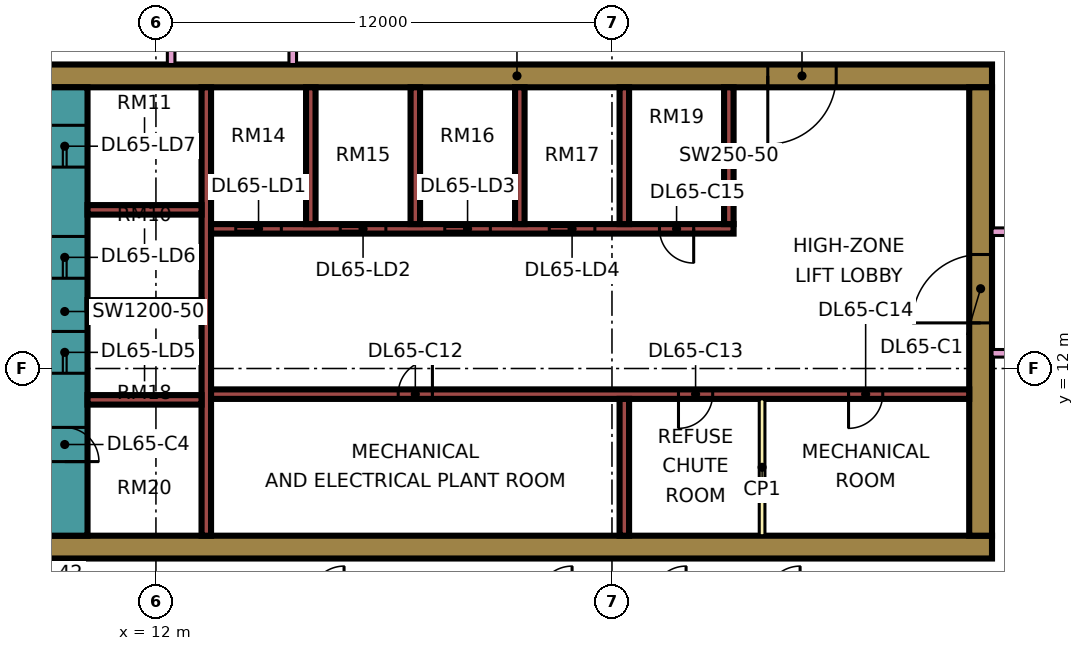
"""IFC4 building model, lengths in metres.
Left out: names, types, materials, properties, quantities, classifications, styles, units other than length and angle.
Written with IfcOpenShell. Run it as: python <this file> out.ifc"""

import sys

from ifc_helpers import new_model, si_unit, direction, frame, frame_2d, origin, place, context, subcontext, project, spatial, rectangle, extrude, element, fill, save


model = new_model("IFC4")
c1 = context("Model", 3, precision=1e-05, world=origin(), true_north=direction((0.0, 1.0)))
c2 = subcontext(c1, "Body", "Model", "MODEL_VIEW")
j1 = project(units=[si_unit("LENGTHUNIT", "METRE"), si_unit("PLANEANGLEUNIT", "RADIAN")], contexts=[c1])
p1 = place(None, origin())
s1 = spatial("IfcSite", under=j1, at=p1, CompositionType="ELEMENT")
p2 = place(p1, origin())
s2 = spatial("IfcBuilding", under=s1, at=p2, CompositionType="ELEMENT")
p3 = place(p2, frame((0.0, 0.0, 280.9)))
s3 = spatial("IfcBuildingStorey", under=s2, at=p3, CompositionType="ELEMENT", Elevation=280.9)
p4 = place(p3, frame((9.0, 7.3, 0.0), z_axis=(0.0, 0.0, 1.0), x_axis=(1.0, 0.0, 0.0)))
e1 = element("IfcWall", 1, at=p4, inside=s3, PredefinedType="SHEAR", context=c2, shape_type="SweptSolid", body=[
    extrude(rectangle(XDim=25.0, YDim=0.6, at=frame_2d((12.5, 0.0))), origin(), (0.0, 0.0, 1.0), 3.75),
])
p5 = place(p3, frame((9.0, 19.7, 0.0), z_axis=(0.0, 0.0, 1.0), x_axis=(1.0, 0.0, 0.0)))
e2 = element("IfcWall", 2, at=p5, inside=s3, PredefinedType="SHEAR", context=c2, shape_type="SweptSolid", body=[
    extrude(rectangle(XDim=25.0, YDim=0.6, at=frame_2d((12.5, 0.0))), origin(), (0.0, 0.0, 1.0), 3.75),
])
p6 = place(p5, frame((19.1, 0.0, 0.0)))
e3 = element("IfcOpeningElement", 3, at=p6, cuts=e2, PredefinedType="OPENING", context=c2, shape_type="SweptSolid", body=[
    extrude(rectangle(XDim=1.8, YDim=2.4, at=frame_2d((0.9, 1.2))), frame((0.0, 0.31, 0.0), z_axis=(0.0, -1.0, 0.0), x_axis=(1.0, 0.0, 0.0)), (0.0, 0.0, 1.0), 0.62),
])
p7 = place(p3, frame((9.6, 7.6, 0.0), z_axis=(0.0, 0.0, 1.0), x_axis=(0.0, 1.0, 0.0)))
e4 = element("IfcWall", 4, at=p7, inside=s3, PredefinedType="SHEAR", context=c2, shape_type="SweptSolid", body=[
    extrude(rectangle(XDim=11.8, YDim=1.2, at=frame_2d((5.9, 0.0))), origin(), (0.0, 0.0, 1.0), 3.75),
])
p8 = place(p7, frame((4.275, 0.0, 0.0)))
e5 = element("IfcOpeningElement", 5, at=p8, cuts=e4, PredefinedType="OPENING", context=c2, shape_type="SweptSolid", body=[
    extrude(rectangle(XDim=1.1, YDim=2.2, at=frame_2d((0.55, 1.1))), frame((0.0, 0.61, 0.0), z_axis=(0.0, -1.0, 0.0), x_axis=(1.0, 0.0, 0.0)), (0.0, 0.0, 1.0), 1.22),
])
p9 = place(p7, frame((6.775, 0.0, 0.0)))
e6 = element("IfcOpeningElement", 6, at=p9, cuts=e4, PredefinedType="OPENING", context=c2, shape_type="SweptSolid", body=[
    extrude(rectangle(XDim=1.1, YDim=2.2, at=frame_2d((0.55, 1.1))), frame((0.0, 0.61, 0.0), z_axis=(0.0, -1.0, 0.0), x_axis=(1.0, 0.0, 0.0)), (0.0, 0.0, 1.0), 1.22),
])
p10 = place(p7, frame((9.7, 0.0, 0.0)))
e7 = element("IfcOpeningElement", 7, at=p10, cuts=e4, PredefinedType="OPENING", context=c2, shape_type="SweptSolid", body=[
    extrude(rectangle(XDim=1.1, YDim=2.2, at=frame_2d((0.55, 1.1))), frame((0.0, 0.61, 0.0), z_axis=(0.0, -1.0, 0.0), x_axis=(1.0, 0.0, 0.0)), (0.0, 0.0, 1.0), 1.22),
])
p11 = place(p7, frame((1.95, 0.0, 0.0)))
e8 = element("IfcOpeningElement", 8, at=p11, cuts=e4, PredefinedType="OPENING", context=c2, shape_type="SweptSolid", body=[
    extrude(rectangle(XDim=0.9, YDim=2.1, at=frame_2d((0.45, 1.05))), frame((0.0, 0.61, 0.0), z_axis=(0.0, -1.0, 0.0), x_axis=(1.0, 0.0, 0.0)), (0.0, 0.0, 1.0), 1.22),
])
p12 = place(p3, frame((33.7, 7.6, 0.0), z_axis=(0.0, 0.0, 1.0), x_axis=(0.0, 1.0, 0.0)))
e9 = element("IfcWall", 9, at=p12, inside=s3, PredefinedType="SHEAR", context=c2, shape_type="SweptSolid", body=[
    extrude(rectangle(XDim=11.8, YDim=0.6, at=frame_2d((5.9, 0.0))), origin(), (0.0, 0.0, 1.0), 3.75),
])
p13 = place(p12, frame((5.6, 0.0, 0.0)))
e10 = element("IfcOpeningElement", 10, at=p13, cuts=e9, PredefinedType="OPENING", context=c2, shape_type="SweptSolid", body=[
    extrude(rectangle(XDim=1.8, YDim=2.4, at=frame_2d((0.9, 1.2))), frame((0.0, 0.31, 0.0), z_axis=(0.0, -1.0, 0.0), x_axis=(1.0, 0.0, 0.0)), (0.0, 0.0, 1.0), 0.62),
])
p14 = place(p3, frame((13.325, 7.6, 0.0), z_axis=(0.0, 0.0, 1.0), x_axis=(0.0, 1.0, 0.0)))
e11 = element("IfcWall", 11, at=p14, inside=s3, PredefinedType="SHEAR", context=c2, shape_type="SweptSolid", body=[
    extrude(rectangle(XDim=11.8, YDim=0.25, at=frame_2d((5.9, 0.0))), origin(), (0.0, 0.0, 1.0), 3.75),
])
p15 = place(p3, frame((13.45, 11.325, 0.0), z_axis=(0.0, 0.0, 1.0), x_axis=(1.0, 0.0, 0.0)))
e12 = element("IfcWall", 12, at=p15, inside=s3, PredefinedType="SHEAR", context=c2, shape_type="SweptSolid", body=[
    extrude(rectangle(XDim=19.95, YDim=0.25, at=frame_2d((9.975, 0.0))), origin(), (0.0, 0.0, 1.0), 3.75),
])
p16 = place(p15, frame((4.925, 0.0, 0.0)))
e13 = element("IfcOpeningElement", 13, at=p16, cuts=e12, PredefinedType="OPENING", context=c2, shape_type="SweptSolid", body=[
    extrude(rectangle(XDim=0.9, YDim=2.1, at=frame_2d((0.45, 1.05))), frame((0.0, 0.135, 0.0), z_axis=(0.0, -1.0, 0.0), x_axis=(1.0, 0.0, 0.0)), (0.0, 0.0, 1.0), 0.27),
])
p17 = place(p15, frame((12.3, 0.0, 0.0)))
e14 = element("IfcOpeningElement", 14, at=p17, cuts=e12, PredefinedType="OPENING", context=c2, shape_type="SweptSolid", body=[
    extrude(rectangle(XDim=0.9, YDim=2.1, at=frame_2d((0.45, 1.05))), frame((0.0, 0.135, 0.0), z_axis=(0.0, -1.0, 0.0), x_axis=(1.0, 0.0, 0.0)), (0.0, 0.0, 1.0), 0.27),
])
p18 = place(p15, frame((16.775, 0.0, 0.0)))
e15 = element("IfcOpeningElement", 15, at=p18, cuts=e12, PredefinedType="OPENING", context=c2, shape_type="SweptSolid", body=[
    extrude(rectangle(XDim=0.9, YDim=2.1, at=frame_2d((0.45, 1.05))), frame((0.0, 0.135, 0.0), z_axis=(0.0, -1.0, 0.0), x_axis=(1.0, 0.0, 0.0)), (0.0, 0.0, 1.0), 0.27),
])
p19 = place(p3, frame((13.45, 15.675, 0.0), z_axis=(0.0, 0.0, 1.0), x_axis=(1.0, 0.0, 0.0)))
e16 = element("IfcWall", 16, at=p19, inside=s3, PredefinedType="SHEAR", context=c2, shape_type="SweptSolid", body=[
    extrude(rectangle(XDim=13.75, YDim=0.25, at=frame_2d((6.875, 0.0))), origin(), (0.0, 0.0, 1.0), 3.75),
])
p20 = place(p19, frame((0.65, 0.0, 0.0)))
e17 = element("IfcOpeningElement", 17, at=p20, cuts=e16, PredefinedType="OPENING", context=c2, shape_type="SweptSolid", body=[
    extrude(rectangle(XDim=1.2, YDim=2.2, at=frame_2d((0.6, 1.1))), frame((0.0, 0.135, 0.0), z_axis=(0.0, -1.0, 0.0), x_axis=(1.0, 0.0, 0.0)), (0.0, 0.0, 1.0), 0.27),
])
p21 = place(p19, frame((3.4, 0.0, 0.0)))
e18 = element("IfcOpeningElement", 18, at=p21, cuts=e16, PredefinedType="OPENING", context=c2, shape_type="SweptSolid", body=[
    extrude(rectangle(XDim=1.2, YDim=2.2, at=frame_2d((0.6, 1.1))), frame((0.0, 0.135, 0.0), z_axis=(0.0, -1.0, 0.0), x_axis=(1.0, 0.0, 0.0)), (0.0, 0.0, 1.0), 0.27),
])
p22 = place(p19, frame((6.15, 0.0, 0.0)))
e19 = element("IfcOpeningElement", 19, at=p22, cuts=e16, PredefinedType="OPENING", context=c2, shape_type="SweptSolid", body=[
    extrude(rectangle(XDim=1.2, YDim=2.2, at=frame_2d((0.6, 1.1))), frame((0.0, 0.135, 0.0), z_axis=(0.0, -1.0, 0.0), x_axis=(1.0, 0.0, 0.0)), (0.0, 0.0, 1.0), 0.27),
])
p23 = place(p19, frame((8.9, 0.0, 0.0)))
e20 = element("IfcOpeningElement", 20, at=p23, cuts=e16, PredefinedType="OPENING", context=c2, shape_type="SweptSolid", body=[
    extrude(rectangle(XDim=1.2, YDim=2.2, at=frame_2d((0.6, 1.1))), frame((0.0, 0.135, 0.0), z_axis=(0.0, -1.0, 0.0), x_axis=(1.0, 0.0, 0.0)), (0.0, 0.0, 1.0), 0.27),
])
p24 = place(p19, frame((11.8, 0.0, 0.0)))
e21 = element("IfcOpeningElement", 21, at=p24, cuts=e16, PredefinedType="OPENING", context=c2, shape_type="SweptSolid", body=[
    extrude(rectangle(XDim=0.9, YDim=2.1, at=frame_2d((0.45, 1.05))), frame((0.0, 0.135, 0.0), z_axis=(0.0, -1.0, 0.0), x_axis=(1.0, 0.0, 0.0)), (0.0, 0.0, 1.0), 0.27),
])
for number, where, z_axis, x_axis in (
    (22, (10.2, 11.175, 0.0), (0.0, 0.0, 1.0), (1.0, 0.0, 0.0)),
    (23, (10.2, 13.675, 0.0), (0.0, 0.0, 1.0), (1.0, 0.0, 0.0)),
    (24, (10.2, 16.175, 0.0), (0.0, 0.0, 1.0), (1.0, 0.0, 0.0)),
):
    element("IfcWall", number, at=place(p3, frame(where, z_axis=z_axis, x_axis=x_axis)), inside=s3, PredefinedType="SHEAR", context=c2, shape_type="SweptSolid", body=[
        extrude(rectangle(XDim=3.0, YDim=0.25, at=frame_2d((1.5, 0.0))), origin(), (0.0, 0.0, 1.0), 3.75),
    ])
for number, where, z_axis, x_axis in (
    (25, (24.325, 7.6, 0.0), (0.0, 0.0, 1.0), (0.0, 1.0, 0.0)),
    (26, (16.075, 15.8, 0.0), (0.0, 0.0, 1.0), (0.0, 1.0, 0.0)),
    (27, (18.825, 15.8, 0.0), (0.0, 0.0, 1.0), (0.0, 1.0, 0.0)),
    (28, (21.575, 15.8, 0.0), (0.0, 0.0, 1.0), (0.0, 1.0, 0.0)),
    (29, (24.325, 15.8, 0.0), (0.0, 0.0, 1.0), (0.0, 1.0, 0.0)),
    (30, (27.075, 15.8, 0.0), (0.0, 0.0, 1.0), (0.0, 1.0, 0.0)),
):
    element("IfcWall", number, at=place(p3, frame(where, z_axis=z_axis, x_axis=x_axis)), inside=s3, PredefinedType="SHEAR", context=c2, shape_type="SweptSolid", body=[
        extrude(rectangle(XDim=3.6, YDim=0.25, at=frame_2d((1.8, 0.0))), origin(), (0.0, 0.0, 1.0), 3.75),
    ])
p25 = place(p3, frame((-1.447, 12.553, 0.0), z_axis=(0.0, 0.0, 1.0), x_axis=(0.707106781187, -0.707106781187, 0.0)))
e31 = element("IfcWall", 31, at=p25, inside=s3, PredefinedType="SOLIDWALL", context=c2, shape_type="SweptSolid", body=[
    extrude(rectangle(XDim=19.799, YDim=0.15, at=frame_2d((9.899, 0.0))), origin(), (0.0, 0.0, 1.0), 3.35),
])
p26 = place(p25, frame((2.212, 0.0, 0.45)))
e32 = element("IfcOpeningElement", 32, at=p26, cuts=e31, PredefinedType="OPENING", context=c2, shape_type="SweptSolid", body=[
    extrude(rectangle(XDim=3.0, YDim=2.4, at=frame_2d((1.5, 1.2))), frame((0.0, 0.085, 0.0), z_axis=(0.0, -1.0, 0.0), x_axis=(1.0, 0.0, 0.0)), (0.0, 0.0, 1.0), 0.17),
])
p27 = place(p25, frame((10.216, 0.0, 0.45)))
e33 = element("IfcOpeningElement", 33, at=p27, cuts=e31, PredefinedType="OPENING", context=c2, shape_type="SweptSolid", body=[
    extrude(rectangle(XDim=3.0, YDim=2.4, at=frame_2d((1.5, 1.2))), frame((0.0, 0.085, 0.0), z_axis=(0.0, -1.0, 0.0), x_axis=(1.0, 0.0, 0.0)), (0.0, 0.0, 1.0), 0.17),
])
p28 = place(p3, frame((27.95, 7.6, 0.0), z_axis=(0.0, 0.0, 1.0), x_axis=(0.0, 1.0, 0.0)))
e34 = element("IfcWall", 34, at=p28, inside=s3, PredefinedType="PARTITIONING", context=c2, shape_type="SweptSolid", body=[
    extrude(rectangle(XDim=3.6, YDim=0.15, at=frame_2d((1.8, 0.0))), origin(), (0.0, 0.0, 1.0), 3.35),
])
p29 = place(p3, frame((12.4, 20.0, 0.0), z_axis=(0.0, 0.0, 1.0), x_axis=(0.0, 1.0, 0.0)))
e35 = element("IfcWall", 35, at=p29, inside=s3, PredefinedType="PARTITIONING", context=c2, shape_type="SweptSolid", body=[
    extrude(rectangle(XDim=33.926, YDim=0.2, at=frame_2d((16.963, 0.0))), origin(), (0.0, 0.0, 1.0), 3.35),
])
p30 = place(p29, frame((25.8, 0.0, 0.0)))
e36 = element("IfcOpeningElement", 36, at=p30, cuts=e35, PredefinedType="OPENING", context=c2, shape_type="SweptSolid", body=[
    extrude(rectangle(XDim=1.0, YDim=2.1, at=frame_2d((0.5, 1.05))), frame((0.0, 0.11, 0.0), z_axis=(0.0, -1.0, 0.0), x_axis=(1.0, 0.0, 0.0)), (0.0, 0.0, 1.0), 0.22),
])
p31 = place(p29, frame((0.6, 0.0, 0.0)))
e37 = element("IfcOpeningElement", 37, at=p31, cuts=e35, PredefinedType="OPENING", context=c2, shape_type="SweptSolid", body=[
    extrude(rectangle(XDim=1.2, YDim=2.1, at=frame_2d((0.6, 1.05))), frame((0.0, 0.11, 0.0), z_axis=(0.0, -1.0, 0.0), x_axis=(1.0, 0.0, 0.0)), (0.0, 0.0, 1.0), 0.22),
])
p32 = place(p29, frame((4.5, 0.0, 0.0)))
e38 = element("IfcOpeningElement", 38, at=p32, cuts=e35, PredefinedType="OPENING", context=c2, shape_type="SweptSolid", body=[
    extrude(rectangle(XDim=1.0, YDim=2.1, at=frame_2d((0.5, 1.05))), frame((0.0, 0.11, 0.0), z_axis=(0.0, -1.0, 0.0), x_axis=(1.0, 0.0, 0.0)), (0.0, 0.0, 1.0), 0.22),
])
p33 = place(p3, frame((15.6, 20.0, 0.0), z_axis=(0.0, 0.0, 1.0), x_axis=(0.0, 1.0, 0.0)))
e39 = element("IfcWall", 39, at=p33, inside=s3, PredefinedType="PARTITIONING", context=c2, shape_type="SweptSolid", body=[
    extrude(rectangle(XDim=27.775, YDim=0.2, at=frame_2d((13.887, 0.0))), origin(), (0.0, 0.0, 1.0), 3.35),
])
p34 = place(p33, frame((5.95, 0.0, 0.0)))
e40 = element("IfcOpeningElement", 40, at=p34, cuts=e39, PredefinedType="OPENING", context=c2, shape_type="SweptSolid", body=[
    extrude(rectangle(XDim=1.0, YDim=2.1, at=frame_2d((0.5, 1.05))), frame((0.0, 0.11, 0.0), z_axis=(0.0, -1.0, 0.0), x_axis=(1.0, 0.0, 0.0)), (0.0, 0.0, 1.0), 0.22),
])
p35 = place(p33, frame((12.0, 0.0, 0.0)))
e41 = element("IfcOpeningElement", 41, at=p35, cuts=e39, PredefinedType="OPENING", context=c2, shape_type="SweptSolid", body=[
    extrude(rectangle(XDim=1.0, YDim=2.1, at=frame_2d((0.5, 1.05))), frame((0.0, 0.11, 0.0), z_axis=(0.0, -1.0, 0.0), x_axis=(1.0, 0.0, 0.0)), (0.0, 0.0, 1.0), 0.22),
])
p36 = place(p33, frame((22.9, 0.0, 0.0)))
e42 = element("IfcOpeningElement", 42, at=p36, cuts=e39, PredefinedType="OPENING", context=c2, shape_type="SweptSolid", body=[
    extrude(rectangle(XDim=1.0, YDim=2.1, at=frame_2d((0.5, 1.05))), frame((0.0, 0.11, 0.0), z_axis=(0.0, -1.0, 0.0), x_axis=(1.0, 0.0, 0.0)), (0.0, 0.0, 1.0), 0.22),
])
p37 = place(p33, frame((1.15, 0.0, 0.0)))
e43 = element("IfcOpeningElement", 43, at=p37, cuts=e39, PredefinedType="OPENING", context=c2, shape_type="SweptSolid", body=[
    extrude(rectangle(XDim=1.8, YDim=2.1, at=frame_2d((0.9, 1.05))), frame((0.0, 0.11, 0.0), z_axis=(0.0, -1.0, 0.0), x_axis=(1.0, 0.0, 0.0)), (0.0, 0.0, 1.0), 0.22),
])
p38 = place(p33, frame((25.9, 0.0, 0.0)))
e44 = element("IfcOpeningElement", 44, at=p38, cuts=e39, PredefinedType="OPENING", context=c2, shape_type="SweptSolid", body=[
    extrude(rectangle(XDim=1.0, YDim=2.1, at=frame_2d((0.5, 1.05))), frame((0.0, 0.11, 0.0), z_axis=(0.0, -1.0, 0.0), x_axis=(1.0, 0.0, 0.0)), (0.0, 0.0, 1.0), 0.22),
])
p39 = place(p3, frame((34.0, 12.4, 0.0), z_axis=(0.0, 0.0, 1.0), x_axis=(1.0, 0.0, 0.0)))
e45 = element("IfcWall", 45, at=p39, inside=s3, PredefinedType="PARTITIONING", context=c2, shape_type="SweptSolid", body=[
    extrude(rectangle(XDim=2.401, YDim=0.2, at=frame_2d((1.2, 0.0))), origin(), (0.0, 0.0, 1.0), 3.35),
])
p40 = place(p3, frame((34.0, 15.6, 0.0), z_axis=(0.0, 0.0, 1.0), x_axis=(1.0, 0.0, 0.0)))
e46 = element("IfcWall", 46, at=p40, inside=s3, PredefinedType="PARTITIONING", context=c2, shape_type="SweptSolid", body=[
    extrude(rectangle(XDim=10.35, YDim=0.2, at=frame_2d((5.175, 0.0))), origin(), (0.0, 0.0, 1.0), 3.35),
])
p41 = place(p40, frame((5.6, 0.0, 0.0)))
e47 = element("IfcOpeningElement", 47, at=p41, cuts=e46, PredefinedType="OPENING", context=c2, shape_type="SweptSolid", body=[
    extrude(rectangle(XDim=1.0, YDim=2.1, at=frame_2d((0.5, 1.05))), frame((0.0, 0.11, 0.0), z_axis=(0.0, -1.0, 0.0), x_axis=(1.0, 0.0, 0.0)), (0.0, 0.0, 1.0), 0.22),
])
p42 = place(p40, frame((0.45, 0.0, 0.0)))
e48 = element("IfcOpeningElement", 48, at=p42, cuts=e46, PredefinedType="OPENING", context=c2, shape_type="SweptSolid", body=[
    extrude(rectangle(XDim=1.2, YDim=2.1, at=frame_2d((0.6, 1.05))), frame((0.0, 0.11, 0.0), z_axis=(0.0, -1.0, 0.0), x_axis=(1.0, 0.0, 0.0)), (0.0, 0.0, 1.0), 0.22),
])
p43 = place(p20, origin())
e49 = element("IfcDoor", 49, at=p43, inside=s3, OperationType="DOUBLE_DOOR_SLIDING", PredefinedType="DOOR", context=c2, shape_type="SweptSolid", body=[
    extrude(rectangle(XDim=1.2, YDim=2.2, at=frame_2d((0.6, 1.1))), frame((0.0, 0.025, 0.0), z_axis=(0.0, -1.0, 0.0), x_axis=(1.0, 0.0, 0.0)), (0.0, 0.0, 1.0), 0.05),
])
fill(e17, e49)
p44 = place(p21, origin())
e50 = element("IfcDoor", 50, at=p44, inside=s3, OperationType="DOUBLE_DOOR_SLIDING", PredefinedType="DOOR", context=c2, shape_type="SweptSolid", body=[
    extrude(rectangle(XDim=1.2, YDim=2.2, at=frame_2d((0.6, 1.1))), frame((0.0, 0.025, 0.0), z_axis=(0.0, -1.0, 0.0), x_axis=(1.0, 0.0, 0.0)), (0.0, 0.0, 1.0), 0.05),
])
fill(e18, e50)
p45 = place(p22, origin())
e51 = element("IfcDoor", 51, at=p45, inside=s3, OperationType="DOUBLE_DOOR_SLIDING", PredefinedType="DOOR", context=c2, shape_type="SweptSolid", body=[
    extrude(rectangle(XDim=1.2, YDim=2.2, at=frame_2d((0.6, 1.1))), frame((0.0, 0.025, 0.0), z_axis=(0.0, -1.0, 0.0), x_axis=(1.0, 0.0, 0.0)), (0.0, 0.0, 1.0), 0.05),
])
fill(e19, e51)
p46 = place(p23, origin())
e52 = element("IfcDoor", 52, at=p46, inside=s3, OperationType="DOUBLE_DOOR_SLIDING", PredefinedType="DOOR", context=c2, shape_type="SweptSolid", body=[
    extrude(rectangle(XDim=1.2, YDim=2.2, at=frame_2d((0.6, 1.1))), frame((0.0, 0.025, 0.0), z_axis=(0.0, -1.0, 0.0), x_axis=(1.0, 0.0, 0.0)), (0.0, 0.0, 1.0), 0.05),
])
fill(e20, e52)
p47 = place(p8, origin())
e53 = element("IfcDoor", 53, at=p47, inside=s3, OperationType="DOUBLE_DOOR_SLIDING", PredefinedType="DOOR", context=c2, shape_type="SweptSolid", body=[
    extrude(rectangle(XDim=1.1, YDim=2.2, at=frame_2d((0.55, 1.1))), frame((0.0, 0.025, 0.0), z_axis=(0.0, -1.0, 0.0), x_axis=(1.0, 0.0, 0.0)), (0.0, 0.0, 1.0), 0.05),
])
fill(e5, e53)
p48 = place(p9, origin())
e54 = element("IfcDoor", 54, at=p48, inside=s3, OperationType="DOUBLE_DOOR_SLIDING", PredefinedType="DOOR", context=c2, shape_type="SweptSolid", body=[
    extrude(rectangle(XDim=1.1, YDim=2.2, at=frame_2d((0.55, 1.1))), frame((0.0, 0.025, 0.0), z_axis=(0.0, -1.0, 0.0), x_axis=(1.0, 0.0, 0.0)), (0.0, 0.0, 1.0), 0.05),
])
fill(e6, e54)
p49 = place(p10, origin())
e55 = element("IfcDoor", 55, at=p49, inside=s3, OperationType="DOUBLE_DOOR_SLIDING", PredefinedType="DOOR", context=c2, shape_type="SweptSolid", body=[
    extrude(rectangle(XDim=1.1, YDim=2.2, at=frame_2d((0.55, 1.1))), frame((0.0, 0.025, 0.0), z_axis=(0.0, -1.0, 0.0), x_axis=(1.0, 0.0, 0.0)), (0.0, 0.0, 1.0), 0.05),
])
fill(e7, e55)
p50 = place(p13, origin())
e56 = element("IfcDoor", 56, at=p50, inside=s3, OperationType="DOUBLE_DOOR_SINGLE_SWING", PredefinedType="DOOR", context=c2, shape_type="SweptSolid", body=[
    extrude(rectangle(XDim=1.8, YDim=2.4, at=frame_2d((0.9, 1.2))), frame((0.0, 0.025, 0.0), z_axis=(0.0, -1.0, 0.0), x_axis=(1.0, 0.0, 0.0)), (0.0, 0.0, 1.0), 0.05),
])
fill(e10, e56)
p51 = place(p6, frame((1.8, 0.0, 0.0), z_axis=(0.0, 0.0, 1.0), x_axis=(-1.0, 0.0, 0.0)))
e57 = element("IfcDoor", 57, at=p51, inside=s3, OperationType="DOUBLE_DOOR_SINGLE_SWING", PredefinedType="DOOR", context=c2, shape_type="SweptSolid", body=[
    extrude(rectangle(XDim=1.8, YDim=2.4, at=frame_2d((0.9, 1.2))), frame((0.0, 0.025, 0.0), z_axis=(0.0, -1.0, 0.0), x_axis=(1.0, 0.0, 0.0)), (0.0, 0.0, 1.0), 0.05),
])
fill(e3, e57)
p52 = place(p11, frame((0.9, 0.0, 0.0), z_axis=(0.0, 0.0, 1.0), x_axis=(-1.0, 0.0, 0.0)))
e58 = element("IfcDoor", 58, at=p52, inside=s3, OperationType="SINGLE_SWING_LEFT", PredefinedType="DOOR", context=c2, shape_type="SweptSolid", body=[
    extrude(rectangle(XDim=0.9, YDim=2.1, at=frame_2d((0.45, 1.05))), frame((0.0, 0.025, 0.0), z_axis=(0.0, -1.0, 0.0), x_axis=(1.0, 0.0, 0.0)), (0.0, 0.0, 1.0), 0.05),
])
fill(e8, e58)
p53 = place(p16, frame((0.9, 0.0, 0.0), z_axis=(0.0, 0.0, 1.0), x_axis=(-1.0, 0.0, 0.0)))
e59 = element("IfcDoor", 59, at=p53, inside=s3, OperationType="SINGLE_SWING_RIGHT", PredefinedType="DOOR", context=c2, shape_type="SweptSolid", body=[
    extrude(rectangle(XDim=0.9, YDim=2.1, at=frame_2d((0.45, 1.05))), frame((0.0, 0.025, 0.0), z_axis=(0.0, -1.0, 0.0), x_axis=(1.0, 0.0, 0.0)), (0.0, 0.0, 1.0), 0.05),
])
fill(e13, e59)
p54 = place(p17, frame((0.9, 0.0, 0.0), z_axis=(0.0, 0.0, 1.0), x_axis=(-1.0, 0.0, 0.0)))
e60 = element("IfcDoor", 60, at=p54, inside=s3, OperationType="SINGLE_SWING_LEFT", PredefinedType="DOOR", context=c2, shape_type="SweptSolid", body=[
    extrude(rectangle(XDim=0.9, YDim=2.1, at=frame_2d((0.45, 1.05))), frame((0.0, 0.025, 0.0), z_axis=(0.0, -1.0, 0.0), x_axis=(1.0, 0.0, 0.0)), (0.0, 0.0, 1.0), 0.05),
])
fill(e14, e60)
p55 = place(p18, frame((0.9, 0.0, 0.0), z_axis=(0.0, 0.0, 1.0), x_axis=(-1.0, 0.0, 0.0)))
e61 = element("IfcDoor", 61, at=p55, inside=s3, OperationType="SINGLE_SWING_LEFT", PredefinedType="DOOR", context=c2, shape_type="SweptSolid", body=[
    extrude(rectangle(XDim=0.9, YDim=2.1, at=frame_2d((0.45, 1.05))), frame((0.0, 0.025, 0.0), z_axis=(0.0, -1.0, 0.0), x_axis=(1.0, 0.0, 0.0)), (0.0, 0.0, 1.0), 0.05),
])
fill(e15, e61)
p56 = place(p24, origin())
e62 = element("IfcDoor", 62, at=p56, inside=s3, OperationType="SINGLE_SWING_RIGHT", PredefinedType="DOOR", context=c2, shape_type="SweptSolid", body=[
    extrude(rectangle(XDim=0.9, YDim=2.1, at=frame_2d((0.45, 1.05))), frame((0.0, 0.025, 0.0), z_axis=(0.0, -1.0, 0.0), x_axis=(1.0, 0.0, 0.0)), (0.0, 0.0, 1.0), 0.05),
])
fill(e21, e62)
save(model, sys.argv[1])
